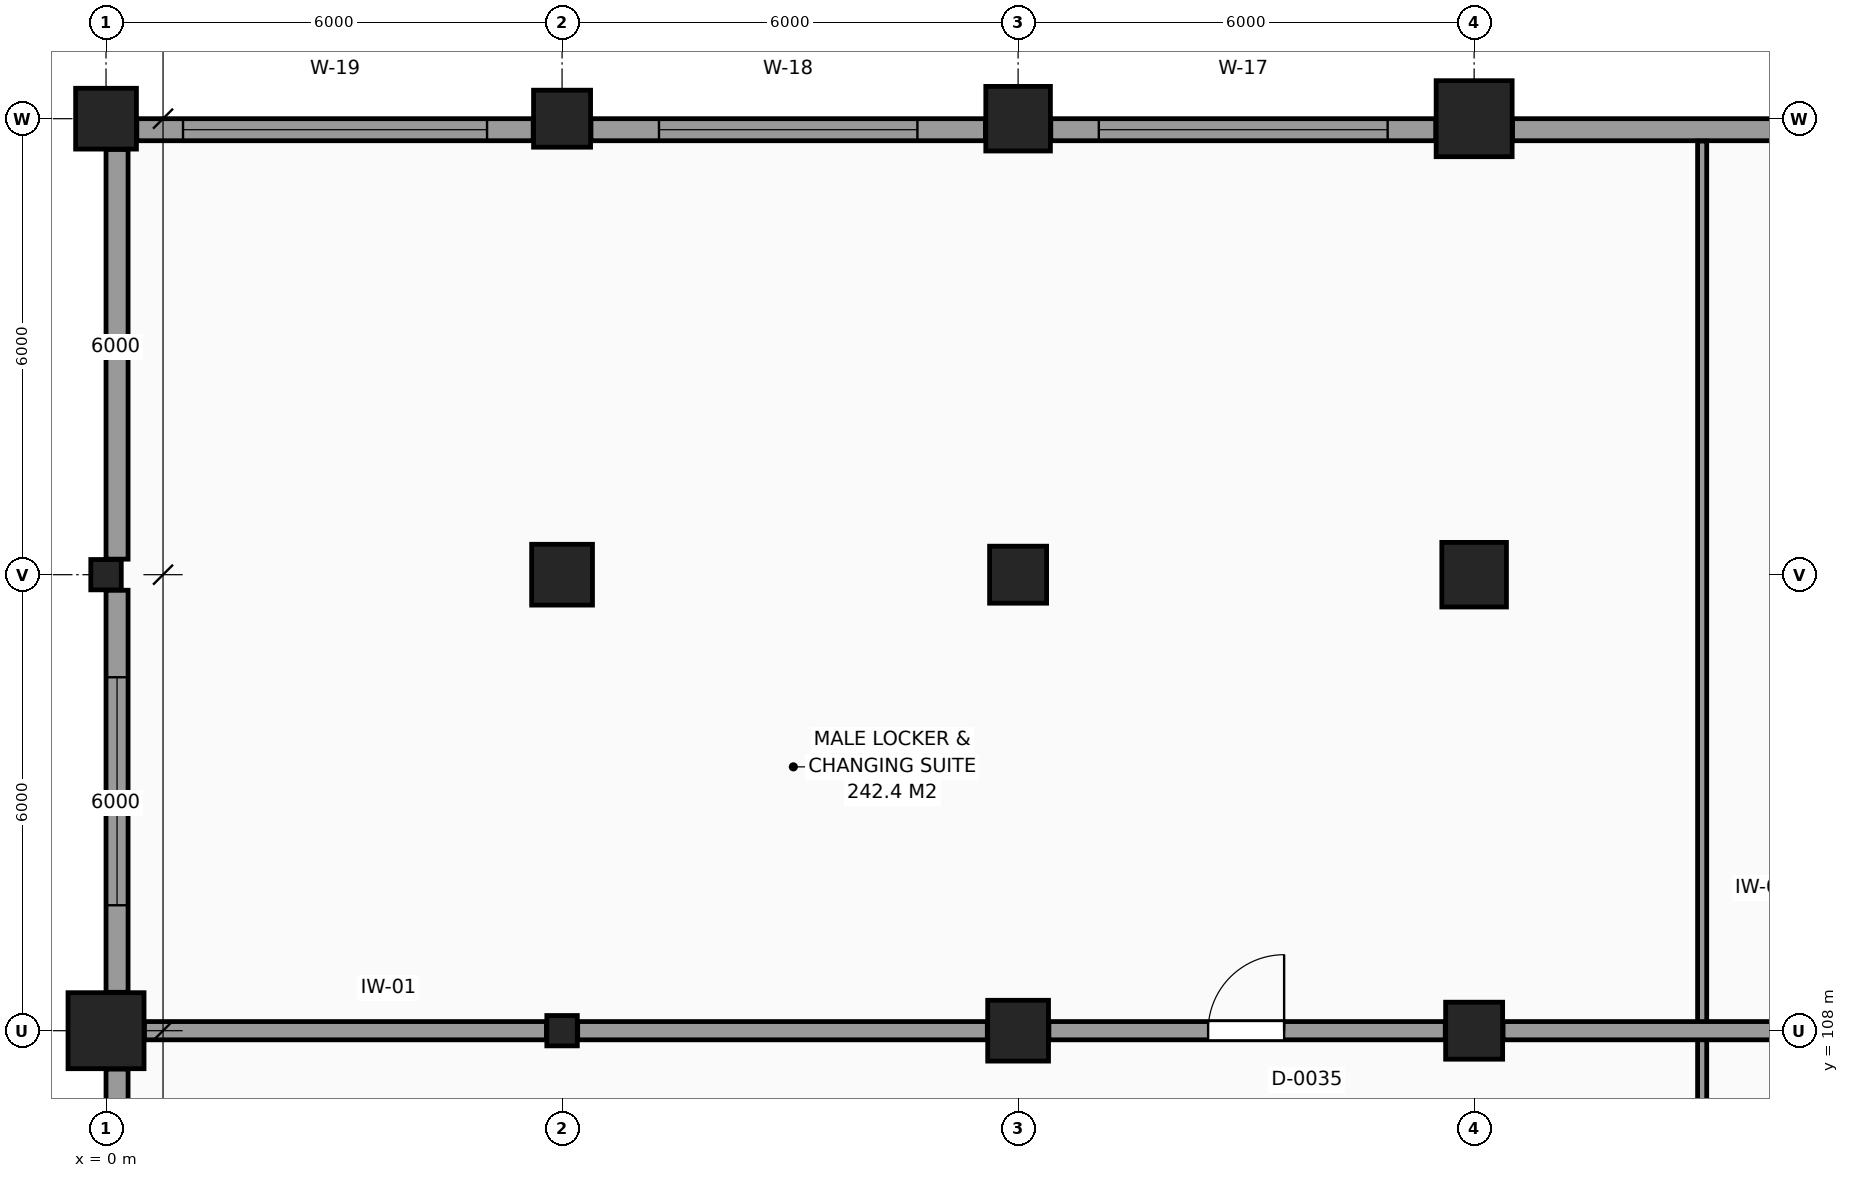
"""IFC4 building model, lengths in metres.
Left out: names, types, materials, properties, quantities, classifications, styles, units other than length and angle.
Written with IfcOpenShell. Run it as: python <this file> out.ifc"""

import sys

from ifc_helpers import new_model, si_unit, direction, frame, frame_2d, origin, origin_2d, place, context, subcontext, project, spatial, rectangle, circle, i_section, extrude, element, fill, save


model = new_model("IFC4")
c1 = context("Model", 3, precision=1e-05, world=origin(), true_north=direction((0.0, 1.0)))
c2 = subcontext(c1, "Body", "Model", "MODEL_VIEW")
j1 = project(units=[si_unit("LENGTHUNIT", "METRE"), si_unit("PLANEANGLEUNIT", "RADIAN")], contexts=[c1])
p1 = place(None, origin())
s1 = spatial("IfcSite", under=j1, at=p1, CompositionType="ELEMENT")
p2 = place(p1, origin())
s2 = spatial("IfcBuilding", under=s1, at=p2, CompositionType="ELEMENT")
p3 = place(p2, origin())
s3 = spatial("IfcBuildingStorey", under=s2, at=p3, CompositionType="ELEMENT", Elevation=0.0)
p4 = place(p3, frame((0.0, 108.0, 0.0), z_axis=(0.0, 0.0, 1.0), x_axis=(1.0, 0.0, 0.0)))
e1 = element("IfcColumn", 1, at=p4, inside=s3, PredefinedType="COLUMN", context=c2, shape_type="SweptSolid", body=[
    extrude(circle(Radius=0.5, at=origin_2d()), origin(), (0.0, 0.0, 1.0), 6.0),
])
p5 = place(p3, frame((0.0, 114.0, 0.0), z_axis=(0.0, 0.0, 1.0), x_axis=(1.0, 0.0, 0.0)))
e2 = element("IfcColumn", 2, at=p5, inside=s3, PredefinedType="COLUMN", context=c2, shape_type="SweptSolid", body=[
    extrude(i_section(OverallWidth=0.401, OverallDepth=0.399, WebThickness=0.019, FlangeThickness=0.03, FilletRadius=0.015, at=origin_2d()), origin(), (0.0, 0.0, 1.0), 6.0),
])
p6 = place(p3, frame((0.0, 120.0, 0.0), z_axis=(0.0, 0.0, 1.0), x_axis=(1.0, 0.0, 0.0)))
e3 = element("IfcColumn", 3, at=p6, inside=s3, PredefinedType="COLUMN", context=c2, shape_type="SweptSolid", body=[
    extrude(rectangle(XDim=0.8, YDim=0.8, at=origin_2d()), origin(), (0.0, 0.0, 1.0), 6.0),
])
p7 = place(p3, frame((6.0, 108.0, 0.0), z_axis=(0.0, 0.0, 1.0), x_axis=(1.0, 0.0, 0.0)))
e4 = element("IfcColumn", 4, at=p7, inside=s3, PredefinedType="COLUMN", context=c2, shape_type="SweptSolid", body=[
    extrude(i_section(OverallWidth=0.401, OverallDepth=0.399, WebThickness=0.019, FlangeThickness=0.03, FilletRadius=0.015, at=origin_2d()), origin(), (0.0, 0.0, 1.0), 6.0),
])
p8 = place(p3, frame((6.0, 114.0, 0.0), z_axis=(0.0, 0.0, 1.0), x_axis=(1.0, 0.0, 0.0)))
e5 = element("IfcColumn", 5, at=p8, inside=s3, PredefinedType="COLUMN", context=c2, shape_type="SweptSolid", body=[
    extrude(rectangle(XDim=0.8, YDim=0.8, at=origin_2d()), origin(), (0.0, 0.0, 1.0), 6.0),
])
p9 = place(p3, frame((6.0, 120.0, 0.0), z_axis=(0.0, 0.0, 1.0), x_axis=(1.0, 0.0, 0.0)))
e6 = element("IfcColumn", 6, at=p9, inside=s3, PredefinedType="COLUMN", context=c2, shape_type="SweptSolid", body=[
    extrude(rectangle(XDim=0.75, YDim=0.75, at=origin_2d()), origin(), (0.0, 0.0, 1.0), 6.0),
])
p10 = place(p3, frame((12.0, 108.0, 0.0), z_axis=(0.0, 0.0, 1.0), x_axis=(1.0, 0.0, 0.0)))
e7 = element("IfcColumn", 7, at=p10, inside=s3, PredefinedType="COLUMN", context=c2, shape_type="SweptSolid", body=[
    extrude(rectangle(XDim=0.8, YDim=0.8, at=origin_2d()), origin(), (0.0, 0.0, 1.0), 6.0),
])
p11 = place(p3, frame((12.0, 114.0, 0.0), z_axis=(0.0, 0.0, 1.0), x_axis=(1.0, 0.0, 0.0)))
e8 = element("IfcColumn", 8, at=p11, inside=s3, PredefinedType="COLUMN", context=c2, shape_type="SweptSolid", body=[
    extrude(rectangle(XDim=0.75, YDim=0.75, at=origin_2d()), origin(), (0.0, 0.0, 1.0), 6.0),
])
p12 = place(p3, frame((12.0, 120.0, 0.0), z_axis=(0.0, 0.0, 1.0), x_axis=(1.0, 0.0, 0.0)))
e9 = element("IfcColumn", 9, at=p12, inside=s3, PredefinedType="COLUMN", context=c2, shape_type="SweptSolid", body=[
    extrude(circle(Radius=0.425, at=origin_2d()), origin(), (0.0, 0.0, 1.0), 6.0),
])
p13 = place(p3, frame((18.0, 108.0, 0.0), z_axis=(0.0, 0.0, 1.0), x_axis=(1.0, 0.0, 0.0)))
e10 = element("IfcColumn", 10, at=p13, inside=s3, PredefinedType="COLUMN", context=c2, shape_type="SweptSolid", body=[
    extrude(rectangle(XDim=0.75, YDim=0.75, at=origin_2d()), origin(), (0.0, 0.0, 1.0), 6.0),
])
p14 = place(p3, frame((18.0, 114.0, 0.0), z_axis=(0.0, 0.0, 1.0), x_axis=(1.0, 0.0, 0.0)))
e11 = element("IfcColumn", 11, at=p14, inside=s3, PredefinedType="COLUMN", context=c2, shape_type="SweptSolid", body=[
    extrude(circle(Radius=0.425, at=origin_2d()), origin(), (0.0, 0.0, 1.0), 6.0),
])
p15 = place(p3, frame((18.0, 120.0, 0.0), z_axis=(0.0, 0.0, 1.0), x_axis=(1.0, 0.0, 0.0)))
e12 = element("IfcColumn", 12, at=p15, inside=s3, PredefinedType="COLUMN", context=c2, shape_type="SweptSolid", body=[
    extrude(circle(Radius=0.5, at=origin_2d()), origin(), (0.0, 0.0, 1.0), 6.0),
])
p16 = place(p3, frame((23.794, 119.855, 0.0), z_axis=(0.0, 0.0, 1.0), x_axis=(-1.0, 0.0, 0.0)))
e13 = element("IfcWall", 13, at=p16, inside=s3, PredefinedType="SOLIDWALL", context=c2, shape_type="SweptSolid", body=[
    extrude(rectangle(XDim=5.29, YDim=0.29, at=frame_2d((2.645, 0.0))), origin(), (0.0, 0.0, 1.0), 4.99),
])
p17 = place(p3, frame((17.495, 119.855, 0.0), z_axis=(0.0, 0.0, 1.0), x_axis=(-1.0, 0.0, 0.0)))
e14 = element("IfcWall", 14, at=p17, inside=s3, PredefinedType="SOLIDWALL", context=c2, shape_type="SweptSolid", body=[
    extrude(rectangle(XDim=5.065, YDim=0.29, at=frame_2d((2.533, 0.0))), origin(), (0.0, 0.0, 1.0), 4.99),
])
p18 = place(p17, frame((0.633, 0.0, 0.85)))
e15 = element("IfcOpeningElement", 15, at=p18, cuts=e14, PredefinedType="OPENING", context=c2, shape_type="SweptSolid", body=[
    extrude(rectangle(XDim=3.8, YDim=1.45, at=frame_2d((1.9, 0.725))), frame((0.0, 0.155, 0.0), z_axis=(0.0, -1.0, 0.0), x_axis=(1.0, 0.0, 0.0)), (0.0, 0.0, 1.0), 0.31),
])
p19 = place(p3, frame((11.57, 119.855, 0.0), z_axis=(0.0, 0.0, 1.0), x_axis=(-1.0, 0.0, 0.0)))
e16 = element("IfcWall", 16, at=p19, inside=s3, PredefinedType="SOLIDWALL", context=c2, shape_type="SweptSolid", body=[
    extrude(rectangle(XDim=5.19, YDim=0.29, at=frame_2d((2.595, 0.0))), origin(), (0.0, 0.0, 1.0), 4.99),
])
p20 = place(p19, frame((0.895, 0.0, 0.85)))
e17 = element("IfcOpeningElement", 17, at=p20, cuts=e16, PredefinedType="OPENING", context=c2, shape_type="SweptSolid", body=[
    extrude(rectangle(XDim=3.4, YDim=1.45, at=frame_2d((1.7, 0.725))), frame((0.0, 0.155, 0.0), z_axis=(0.0, -1.0, 0.0), x_axis=(1.0, 0.0, 0.0)), (0.0, 0.0, 1.0), 0.31),
])
p21 = place(p3, frame((5.62, 119.855, 0.0), z_axis=(0.0, 0.0, 1.0), x_axis=(-1.0, 0.0, 0.0)))
e18 = element("IfcWall", 18, at=p21, inside=s3, PredefinedType="SOLIDWALL", context=c2, shape_type="SweptSolid", body=[
    extrude(rectangle(XDim=5.215, YDim=0.29, at=frame_2d((2.607, 0.0))), origin(), (0.0, 0.0, 1.0), 4.99),
])
p22 = place(p21, frame((0.607, 0.0, 0.85)))
e19 = element("IfcOpeningElement", 19, at=p22, cuts=e18, PredefinedType="OPENING", context=c2, shape_type="SweptSolid", body=[
    extrude(rectangle(XDim=4.0, YDim=1.3, at=frame_2d((2.0, 0.65))), frame((0.0, 0.155, 0.0), z_axis=(0.0, -1.0, 0.0), x_axis=(1.0, 0.0, 0.0)), (0.0, 0.0, 1.0), 0.31),
])
p23 = place(p3, frame((0.145, 119.595, 0.0), z_axis=(0.0, 0.0, 1.0), x_axis=(0.0, -1.0, 0.0)))
e20 = element("IfcWall", 20, at=p23, inside=s3, PredefinedType="SOLIDWALL", context=c2, shape_type="SweptSolid", body=[
    extrude(rectangle(XDim=5.39, YDim=0.29, at=frame_2d((2.695, 0.0))), origin(), (0.0, 0.0, 1.0), 4.99),
])
p24 = place(p3, frame((0.145, 113.795, 0.0), z_axis=(0.0, 0.0, 1.0), x_axis=(0.0, -1.0, 0.0)))
e21 = element("IfcWall", 21, at=p24, inside=s3, PredefinedType="SOLIDWALL", context=c2, shape_type="SweptSolid", body=[
    extrude(rectangle(XDim=5.291, YDim=0.29, at=frame_2d((2.645, 0.0))), origin(), (0.0, 0.0, 1.0), 4.99),
])
p25 = place(p24, frame((1.145, 0.0, 0.85)))
e22 = element("IfcOpeningElement", 22, at=p25, cuts=e21, PredefinedType="OPENING", context=c2, shape_type="SweptSolid", body=[
    extrude(rectangle(XDim=3.0, YDim=1.9, at=frame_2d((1.5, 0.95))), frame((0.0, 0.155, 0.0), z_axis=(0.0, -1.0, 0.0), x_axis=(1.0, 0.0, 0.0)), (0.0, 0.0, 1.0), 0.31),
])
p26 = place(p3, frame((0.145, 107.495, 0.0), z_axis=(0.0, 0.0, 1.0), x_axis=(0.0, -1.0, 0.0)))
e23 = element("IfcWall", 23, at=p26, inside=s3, PredefinedType="SOLIDWALL", context=c2, shape_type="SweptSolid", body=[
    extrude(rectangle(XDim=5.065, YDim=0.29, at=frame_2d((2.533, 0.0))), origin(), (0.0, 0.0, 1.0), 4.99),
])
p27 = place(p26, frame((1.132, 0.0, 0.85)))
e24 = element("IfcOpeningElement", 24, at=p27, cuts=e23, PredefinedType="OPENING", context=c2, shape_type="SweptSolid", body=[
    extrude(rectangle(XDim=2.8, YDim=1.9, at=frame_2d((1.4, 0.95))), frame((0.0, 0.155, 0.0), z_axis=(0.0, -1.0, 0.0), x_axis=(1.0, 0.0, 0.0)), (0.0, 0.0, 1.0), 0.31),
])
p28 = place(p3, frame((21.0, 84.0, 0.0), z_axis=(0.0, 0.0, 1.0), x_axis=(0.0, 1.0, 0.0)))
e25 = element("IfcWall", 25, at=p28, inside=s3, PredefinedType="PARTITIONING", context=c2, shape_type="SweptSolid", body=[
    extrude(rectangle(XDim=35.705, YDim=0.12, at=frame_2d((17.853, 0.0))), origin(), (0.0, 0.0, 1.0), 5.24),
])
p29 = place(p28, frame((14.2, 0.0, 0.0)))
e26 = element("IfcOpeningElement", 26, at=p29, cuts=e25, PredefinedType="OPENING", context=c2, shape_type="SweptSolid", body=[
    extrude(rectangle(XDim=1.6, YDim=2.25, at=frame_2d((0.8, 1.125))), frame((0.0, 0.07, 0.0), z_axis=(0.0, -1.0, 0.0), x_axis=(1.0, 0.0, 0.0)), (0.0, 0.0, 1.0), 0.14),
])
p30 = place(p3, frame((0.505, 108.0, 0.0), z_axis=(0.0, 0.0, 1.0), x_axis=(1.0, 0.0, 0.0)))
e27 = element("IfcWall", 27, at=p30, inside=s3, PredefinedType="PARTITIONING", context=c2, shape_type="SweptSolid", body=[
    extrude(rectangle(XDim=5.29, YDim=0.24, at=frame_2d((2.645, 0.0))), origin(), (0.0, 0.0, 1.0), 5.04),
])
p31 = place(p3, frame((6.206, 108.0, 0.0), z_axis=(0.0, 0.0, 1.0), x_axis=(1.0, 0.0, 0.0)))
e28 = element("IfcWall", 28, at=p31, inside=s3, PredefinedType="PARTITIONING", context=c2, shape_type="SweptSolid", body=[
    extrude(rectangle(XDim=5.389, YDim=0.24, at=frame_2d((2.695, 0.0))), origin(), (0.0, 0.0, 1.0), 5.14),
])
p32 = place(p3, frame((12.405, 108.0, 0.0), z_axis=(0.0, 0.0, 1.0), x_axis=(1.0, 0.0, 0.0)))
e29 = element("IfcWall", 29, at=p32, inside=s3, PredefinedType="PARTITIONING", context=c2, shape_type="SweptSolid", body=[
    extrude(rectangle(XDim=5.215, YDim=0.24, at=frame_2d((2.607, 0.0))), origin(), (0.0, 0.0, 1.0), 5.29),
])
p33 = place(p32, frame((2.095, 0.0, 0.0)))
e30 = element("IfcOpeningElement", 30, at=p33, cuts=e29, PredefinedType="OPENING", context=c2, shape_type="SweptSolid", body=[
    extrude(rectangle(XDim=1.0, YDim=2.15, at=frame_2d((0.5, 1.075))), frame((0.0, 0.13, 0.0), z_axis=(0.0, -1.0, 0.0), x_axis=(1.0, 0.0, 0.0)), (0.0, 0.0, 1.0), 0.26),
])
p34 = place(p3, frame((18.38, 108.0, 0.0), z_axis=(0.0, 0.0, 1.0), x_axis=(1.0, 0.0, 0.0)))
e31 = element("IfcWall", 31, at=p34, inside=s3, PredefinedType="PARTITIONING", context=c2, shape_type="SweptSolid", body=[
    extrude(rectangle(XDim=5.19, YDim=0.24, at=frame_2d((2.595, 0.0))), origin(), (0.0, 0.0, 1.0), 5.45),
])
p35 = place(p25, origin())
e32 = element("IfcWindow", 32, at=p35, inside=s3, PartitioningType="SINGLE_PANEL", PredefinedType="WINDOW", context=c2, shape_type="SweptSolid", body=[
    extrude(rectangle(XDim=3.0, YDim=1.9, at=frame_2d((1.5, 0.95))), frame((0.0, 0.03, 0.0), z_axis=(0.0, -1.0, 0.0), x_axis=(1.0, 0.0, 0.0)), (0.0, 0.0, 1.0), 0.06),
])
fill(e22, e32)
p36 = place(p18, origin())
e33 = element("IfcWindow", 33, at=p36, inside=s3, PartitioningType="SINGLE_PANEL", PredefinedType="WINDOW", context=c2, shape_type="SweptSolid", body=[
    extrude(rectangle(XDim=3.8, YDim=1.45, at=frame_2d((1.9, 0.725))), frame((0.0, 0.03, 0.0), z_axis=(0.0, -1.0, 0.0), x_axis=(1.0, 0.0, 0.0)), (0.0, 0.0, 1.0), 0.06),
])
fill(e15, e33)
p37 = place(p20, origin())
e34 = element("IfcWindow", 34, at=p37, inside=s3, PartitioningType="SINGLE_PANEL", PredefinedType="WINDOW", context=c2, shape_type="SweptSolid", body=[
    extrude(rectangle(XDim=3.4, YDim=1.45, at=frame_2d((1.7, 0.725))), frame((0.0, 0.03, 0.0), z_axis=(0.0, -1.0, 0.0), x_axis=(1.0, 0.0, 0.0)), (0.0, 0.0, 1.0), 0.06),
])
fill(e17, e34)
p38 = place(p22, origin())
e35 = element("IfcWindow", 35, at=p38, inside=s3, PartitioningType="SINGLE_PANEL", PredefinedType="WINDOW", context=c2, shape_type="SweptSolid", body=[
    extrude(rectangle(XDim=4.0, YDim=1.3, at=frame_2d((2.0, 0.65))), frame((0.0, 0.03, 0.0), z_axis=(0.0, -1.0, 0.0), x_axis=(1.0, 0.0, 0.0)), (0.0, 0.0, 1.0), 0.06),
])
fill(e19, e35)
p39 = place(p33, origin())
e36 = element("IfcDoor", 36, at=p39, inside=s3, OperationType="SINGLE_SWING_RIGHT", PredefinedType="DOOR", context=c2, shape_type="SweptSolid", body=[
    extrude(rectangle(XDim=1.0, YDim=2.15, at=frame_2d((0.5, 1.075))), frame((0.0, 0.025, 0.0), z_axis=(0.0, -1.0, 0.0), x_axis=(1.0, 0.0, 0.0)), (0.0, 0.0, 1.0), 0.05),
])
fill(e30, e36)
save(model, sys.argv[1])
